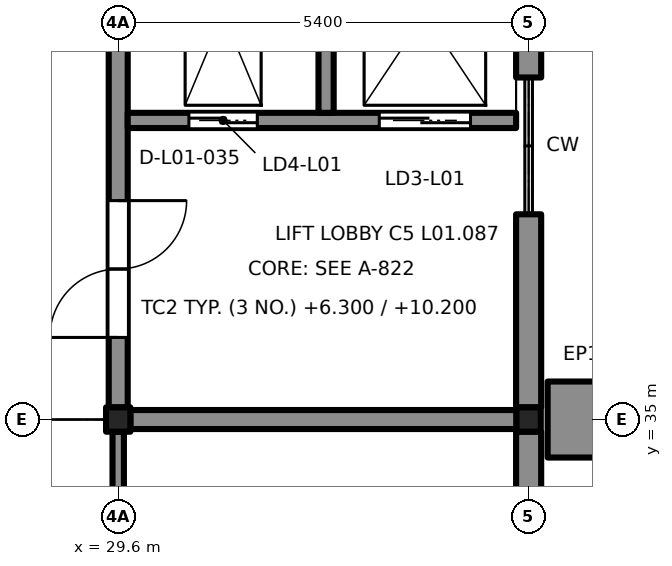
"""IFC4 building model, lengths in metres.
Left out: names, types, materials, properties, quantities, classifications, styles, units other than length and angle.
Written with IfcOpenShell. Run it as: python <this file> out.ifc"""

import sys

from ifc_helpers import new_model, si_unit, direction, frame, frame_2d, origin, origin_2d, place, context, subcontext, project, spatial, rectangle, extrude, element, fill, save


model = new_model("IFC4")
c1 = context("Model", 3, precision=1e-05, world=origin(), true_north=direction((0.0, 1.0)))
c2 = subcontext(c1, "Body", "Model", "MODEL_VIEW")
j1 = project(units=[si_unit("LENGTHUNIT", "METRE"), si_unit("PLANEANGLEUNIT", "RADIAN")], contexts=[c1])
p1 = place(None, origin())
s1 = spatial("IfcSite", under=j1, at=p1, CompositionType="ELEMENT")
p2 = place(p1, origin())
s2 = spatial("IfcBuilding", under=s1, at=p2, CompositionType="ELEMENT")
p3 = place(p2, frame((0.0, 0.0, 6.3)))
s3 = spatial("IfcBuildingStorey", under=s2, at=p3, CompositionType="ELEMENT", Elevation=6.3)
for number, where, z_axis, x_axis in (
    (1, (29.6, 35.0, 0.0), (0.0, 0.0, 1.0), (1.0, 0.0, 0.0)),
    (2, (35.0, 35.0, 0.0), (0.0, 0.0, 1.0), (1.0, 0.0, 0.0)),
):
    element("IfcColumn", number, at=place(p3, frame(where, z_axis=z_axis, x_axis=x_axis)), inside=s3, PredefinedType="COLUMN", context=c2, shape_type="SweptSolid", body=[
        extrude(rectangle(XDim=0.32, YDim=0.32, at=origin_2d()), origin(), (0.0, 0.0, 1.0), 3.9),
    ])
p4 = place(p3, frame((29.6, 35.16, 0.0), z_axis=(0.0, 0.0, 1.0), x_axis=(0.0, 1.0, 0.0)))
e3 = element("IfcWall", 3, at=p4, inside=s3, PredefinedType="SHEAR", context=c2, shape_type="SweptSolid", body=[
    extrude(rectangle(XDim=6.875, YDim=0.25, at=frame_2d((3.438, 0.0))), origin(), (0.0, 0.0, 1.0), 3.65),
])
p5 = place(p4, frame((0.92, 0.0, 0.0)))
e4 = element("IfcOpeningElement", 4, at=p5, cuts=e3, PredefinedType="OPENING", context=c2, shape_type="SweptSolid", body=[
    extrude(rectangle(XDim=1.8, YDim=2.1, at=frame_2d((0.9, 1.05))), frame((0.0, 0.135, 0.0), z_axis=(0.0, -1.0, 0.0), x_axis=(1.0, 0.0, 0.0)), (0.0, 0.0, 1.0), 0.27),
])
p6 = place(p3, frame((29.76, 35.0, 0.0), z_axis=(0.0, 0.0, 1.0), x_axis=(1.0, 0.0, 0.0)))
e5 = element("IfcWall", 5, at=p6, inside=s3, PredefinedType="SHEAR", context=c2, shape_type="SweptSolid", body=[
    extrude(rectangle(XDim=5.08, YDim=0.25, at=frame_2d((2.54, 0.0))), origin(), (0.0, 0.0, 1.0), 3.65),
])
p7 = place(p3, frame((29.725, 38.935, 0.0), z_axis=(0.0, 0.0, 1.0), x_axis=(1.0, 0.0, 0.0)))
e6 = element("IfcWall", 6, at=p7, inside=s3, PredefinedType="SHEAR", context=c2, shape_type="SweptSolid", body=[
    extrude(rectangle(XDim=5.11, YDim=0.2, at=frame_2d((2.555, 0.0))), origin(), (0.0, 0.0, 1.0), 3.65),
])
p8 = place(p7, frame((3.31, 0.0, 0.0)))
e7 = element("IfcOpeningElement", 7, at=p8, cuts=e6, PredefinedType="OPENING", context=c2, shape_type="SweptSolid", body=[
    extrude(rectangle(XDim=1.2, YDim=2.1, at=frame_2d((0.6, 1.05))), frame((0.0, 0.11, 0.0), z_axis=(0.0, -1.0, 0.0), x_axis=(1.0, 0.0, 0.0)), (0.0, 0.0, 1.0), 0.22),
])
p9 = place(p7, frame((0.805, 0.0, 0.0)))
e8 = element("IfcOpeningElement", 8, at=p9, cuts=e6, PredefinedType="OPENING", context=c2, shape_type="SweptSolid", body=[
    extrude(rectangle(XDim=0.9, YDim=2.1, at=frame_2d((0.45, 1.05))), frame((0.0, 0.11, 0.0), z_axis=(0.0, -1.0, 0.0), x_axis=(1.0, 0.0, 0.0)), (0.0, 0.0, 1.0), 0.22),
])
p10 = place(p3, frame((32.335, 42.035, 0.0), z_axis=(0.0, 0.0, 1.0), x_axis=(0.0, -1.0, 0.0)))
e9 = element("IfcWall", 9, at=p10, inside=s3, PredefinedType="SHEAR", context=c2, shape_type="SweptSolid", body=[
    extrude(rectangle(XDim=3.0, YDim=0.2, at=frame_2d((1.5, 0.0))), origin(), (0.0, 0.0, 1.0), 3.65),
])
p11 = place(p3, frame((35.0, 34.84, 0.0), z_axis=(0.0, 0.0, 1.0), x_axis=(0.0, -1.0, 0.0)))
e10 = element("IfcWall", 10, at=p11, inside=s3, PredefinedType="SOLIDWALL", context=c2, shape_type="SweptSolid", body=[
    extrude(rectangle(XDim=3.44, YDim=0.33, at=frame_2d((1.72, 0.0))), origin(), (0.0, 0.0, 1.0), 3.22),
])
p12 = place(p11, frame((1.04, 0.0, 0.9)))
e11 = element("IfcOpeningElement", 11, at=p12, cuts=e10, PredefinedType="OPENING", context=c2, shape_type="SweptSolid", body=[
    extrude(rectangle(XDim=1.2, YDim=1.5, at=frame_2d((0.6, 0.75))), frame((0.0, 0.175, 0.0), z_axis=(0.0, -1.0, 0.0), x_axis=(1.0, 0.0, 0.0)), (0.0, 0.0, 1.0), 0.35),
])
p13 = place(p3, frame((35.0, 37.7, 0.0), z_axis=(0.0, 0.0, 1.0), x_axis=(0.0, -1.0, 0.0)))
e12 = element("IfcWall", 12, at=p13, inside=s3, PredefinedType="SOLIDWALL", context=c2, shape_type="SweptSolid", body=[
    extrude(rectangle(XDim=2.54, YDim=0.33, at=frame_2d((1.27, 0.0))), origin(), (0.0, 0.0, 1.0), 3.22),
])
p14 = place(p3, frame((35.0, 42.365, 0.0), z_axis=(0.0, 0.0, 1.0), x_axis=(0.0, -1.0, 0.0)))
e13 = element("IfcWall", 13, at=p14, inside=s3, PredefinedType="SOLIDWALL", context=c2, shape_type="SweptSolid", body=[
    extrude(rectangle(XDim=2.865, YDim=0.33, at=frame_2d((1.433, 0.0))), origin(), (0.0, 0.0, 1.0), 3.22),
])
p15 = place(p3, frame((35.625, 35.5, 0.0), z_axis=(0.0, 0.0, 1.0), x_axis=(0.0, -1.0, 0.0)))
e14 = element("IfcWall", 14, at=p15, inside=s3, PredefinedType="SOLIDWALL", context=c2, shape_type="SweptSolid", body=[
    extrude(rectangle(XDim=1.0, YDim=0.75, at=frame_2d((0.5, 0.0))), origin(), (0.0, 0.0, 1.0), 3.9),
])
p16 = place(p3, frame((29.6, 34.84, 0.0), z_axis=(0.0, 0.0, 1.0), x_axis=(0.0, -1.0, 0.0)))
e15 = element("IfcWall", 15, at=p16, inside=s3, PredefinedType="PARTITIONING", context=c2, shape_type="SweptSolid", body=[
    extrude(rectangle(XDim=3.44, YDim=0.15, at=frame_2d((1.72, 0.0))), origin(), (0.0, 0.0, 1.0), 3.22),
])
p17 = place(p16, frame((1.14, 0.0, 0.0)))
e16 = element("IfcOpeningElement", 16, at=p17, cuts=e15, PredefinedType="OPENING", context=c2, shape_type="SweptSolid", body=[
    extrude(rectangle(XDim=1.0, YDim=2.1, at=frame_2d((0.5, 1.05))), frame((0.0, 0.085, 0.0), z_axis=(0.0, -1.0, 0.0), x_axis=(1.0, 0.0, 0.0)), (0.0, 0.0, 1.0), 0.17),
])
p18 = place(p5, origin())
e17 = element("IfcDoor", 17, at=p18, inside=s3, OperationType="DOUBLE_DOOR_SINGLE_SWING", PredefinedType="DOOR", context=c2, shape_type="SweptSolid", body=[
    extrude(rectangle(XDim=1.8, YDim=2.1, at=frame_2d((0.9, 1.05))), frame((0.0, 0.025, 0.0), z_axis=(0.0, -1.0, 0.0), x_axis=(1.0, 0.0, 0.0)), (0.0, 0.0, 1.0), 0.05),
])
fill(e4, e17)
p19 = place(p8, origin())
e18 = element("IfcDoor", 18, at=p19, inside=s3, OperationType="DOUBLE_DOOR_SLIDING", PredefinedType="DOOR", context=c2, shape_type="SweptSolid", body=[
    extrude(rectangle(XDim=1.2, YDim=2.1, at=frame_2d((0.6, 1.05))), frame((0.0, 0.025, 0.0), z_axis=(0.0, -1.0, 0.0), x_axis=(1.0, 0.0, 0.0)), (0.0, 0.0, 1.0), 0.05),
])
fill(e7, e18)
p20 = place(p9, origin())
e19 = element("IfcDoor", 19, at=p20, inside=s3, OperationType="DOUBLE_DOOR_SLIDING", PredefinedType="DOOR", context=c2, shape_type="SweptSolid", body=[
    extrude(rectangle(XDim=0.9, YDim=2.1, at=frame_2d((0.45, 1.05))), frame((0.0, 0.025, 0.0), z_axis=(0.0, -1.0, 0.0), x_axis=(1.0, 0.0, 0.0)), (0.0, 0.0, 1.0), 0.05),
])
fill(e8, e19)
save(model, sys.argv[1])
